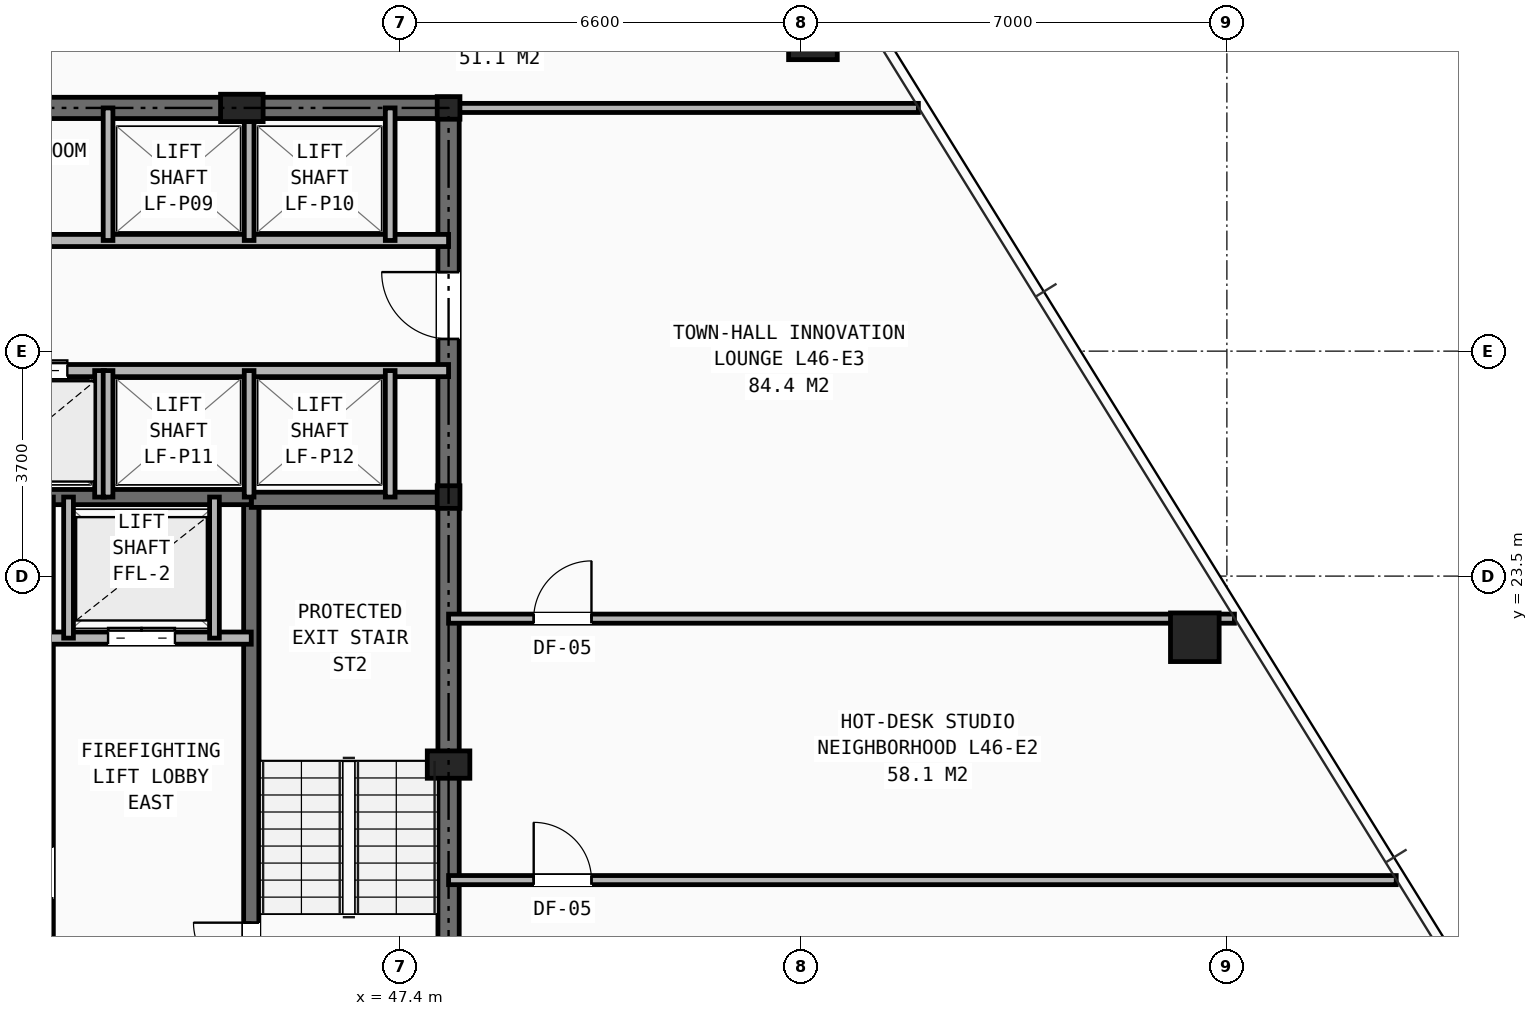
"""IFC4 building model, lengths in metres.
Left out: names, types, materials, properties, quantities, classifications, styles, units other than length and angle.
Written with IfcOpenShell. Run it as: python <this file> out.ifc"""

import sys

from ifc_helpers import new_model, si_unit, direction, frame, frame_2d, origin, origin_2d, place, context, subcontext, project, spatial, rectangle, hollow_rectangle, i_section, extrude, element, fill, save


model = new_model("IFC4")
c1 = context("Model", 3, precision=1e-05, world=origin(), true_north=direction((0.0, 1.0)))
c2 = subcontext(c1, "Body", "Model", "MODEL_VIEW")
j1 = project(units=[si_unit("LENGTHUNIT", "METRE"), si_unit("PLANEANGLEUNIT", "RADIAN")], contexts=[c1])
p1 = place(None, origin())
s1 = spatial("IfcSite", under=j1, at=p1, CompositionType="ELEMENT")
p2 = place(p1, origin())
s2 = spatial("IfcBuilding", under=s1, at=p2, CompositionType="ELEMENT")
p3 = place(p2, frame((0.0, 0.0, 162.0)))
s3 = spatial("IfcBuildingStorey", under=s2, at=p3, CompositionType="ELEMENT", Elevation=162.0)
for number, where, z_axis, x_axis in (
    (1, (48.2, 24.8, 0.0), (0.0, 0.0, 1.0), (1.0, 0.0, 0.0)),
    (2, (48.2, 31.2, 0.0), (0.0, 0.0, 1.0), (1.0, 0.0, 0.0)),
):
    element("IfcColumn", number, at=place(p3, frame(where, z_axis=z_axis, x_axis=x_axis)), inside=s3, PredefinedType="COLUMN", context=c2, shape_type="SweptSolid", body=[
        extrude(i_section(OverallWidth=0.374, OverallDepth=0.372, WebThickness=0.016, FlangeThickness=0.026, at=origin_2d()), origin(), (0.0, 0.0, 1.0), 3.45),
    ])
for number, where, z_axis, x_axis in (
    (3, (48.2, 20.4, 0.0), (0.0, 0.0, 1.0), (1.0, 0.0, 0.0)),
    (4, (44.8, 31.2, 0.0), (0.0, 0.0, 1.0), (1.0, 0.0, 0.0)),
):
    element("IfcColumn", number, at=place(p3, frame(where, z_axis=z_axis, x_axis=x_axis)), inside=s3, PredefinedType="PILASTER", context=c2, shape_type="SweptSolid", body=[
        extrude(rectangle(XDim=0.7, YDim=0.45, at=origin_2d()), origin(), (0.0, 0.0, 1.0), 3.45),
    ])
for number, where, z_axis, x_axis in (
    (5, (60.473, 22.494, 0.0), (0.0, 0.0, 1.0), (1.0, 0.0, 0.0)),
    (6, (54.192, 32.394, 0.0), (0.0, 0.0, 1.0), (1.0, 0.0, 0.0)),
):
    element("IfcColumn", number, at=place(p3, frame(where, z_axis=z_axis, x_axis=x_axis)), inside=s3, PredefinedType="COLUMN", context=c2, shape_type="SweptSolid", body=[
        extrude(hollow_rectangle(XDim=0.8, YDim=0.8, WallThickness=0.055, at=origin_2d()), origin(), (0.0, 0.0, 1.0), 3.45),
    ])
p4 = place(p3, frame((31.8, 31.2, 0.0), z_axis=(0.0, 0.0, 1.0), x_axis=(1.0, 0.0, 0.0)))
e7 = element("IfcWall", 7, at=p4, inside=s3, PredefinedType="SHEAR", context=c2, shape_type="SweptSolid", body=[
    extrude(rectangle(XDim=16.4, YDim=0.35, at=frame_2d((8.2, 0.0))), origin(), (0.0, 0.0, 1.0), 3.21),
])
p5 = place(p3, frame((48.2, 16.4, 0.0), z_axis=(0.0, 0.0, 1.0), x_axis=(0.0, 1.0, 0.0)))
e8 = element("IfcWall", 8, at=p5, inside=s3, PredefinedType="SHEAR", context=c2, shape_type="SweptSolid", body=[
    extrude(rectangle(XDim=14.8, YDim=0.35, at=frame_2d((7.4, 0.0))), origin(), (0.0, 0.0, 1.0), 3.21),
])
p6 = place(p5, frame((11.0, 0.0, 0.0)))
e9 = element("IfcOpeningElement", 9, at=p6, cuts=e8, PredefinedType="OPENING", context=c2, shape_type="SweptSolid", body=[
    extrude(rectangle(XDim=1.1, YDim=2.15, at=frame_2d((0.55, 1.075))), frame((0.0, 0.185, 0.0), z_axis=(0.0, -1.0, 0.0), x_axis=(1.0, 0.0, 0.0)), (0.0, 0.0, 1.0), 0.37),
])
p7 = place(p3, frame((44.955, 16.4, 0.0), z_axis=(0.0, 0.0, 1.0), x_axis=(0.0, 1.0, 0.0)))
e10 = element("IfcWall", 10, at=p7, inside=s3, PredefinedType="SHEAR", context=c2, shape_type="SweptSolid", body=[
    extrude(rectangle(XDim=8.4, YDim=0.25, at=frame_2d((4.2, 0.0))), origin(), (0.0, 0.0, 1.0), 3.21),
])
p8 = place(p7, frame((0.45, 0.0, 0.0)))
e11 = element("IfcOpeningElement", 11, at=p8, cuts=e10, PredefinedType="OPENING", context=c2, shape_type="SweptSolid", body=[
    extrude(rectangle(XDim=0.95, YDim=2.1, at=frame_2d((0.475, 1.05))), frame((0.0, 0.135, 0.0), z_axis=(0.0, -1.0, 0.0), x_axis=(1.0, 0.0, 0.0)), (0.0, 0.0, 1.0), 0.27),
])
p9 = place(p3, frame((44.955, 24.755, 0.0), z_axis=(0.0, 0.0, 1.0), x_axis=(1.0, 0.0, 0.0)))
e12 = element("IfcWall", 12, at=p9, inside=s3, PredefinedType="SHEAR", context=c2, shape_type="SweptSolid", body=[
    extrude(rectangle(XDim=3.245, YDim=0.25, at=frame_2d((1.623, 0.0))), origin(), (0.0, 0.0, 1.0), 3.21),
])
p10 = place(p3, frame((35.045, 24.8, 0.0), z_axis=(0.0, 0.0, 1.0), x_axis=(1.0, 0.0, 0.0)))
e13 = element("IfcWall", 13, at=p10, inside=s3, PredefinedType="SHEAR", context=c2, shape_type="SweptSolid", body=[
    extrude(rectangle(XDim=9.91, YDim=0.25, at=frame_2d((4.955, 0.0))), origin(), (0.0, 0.0, 1.0), 3.21),
])
p11 = place(p3, frame((41.61, 16.4, 0.0), z_axis=(0.0, 0.0, 1.0), x_axis=(0.0, 1.0, 0.0)))
e14 = element("IfcWall", 14, at=p11, inside=s3, PredefinedType="PARTITIONING", context=c2, shape_type="SweptSolid", body=[
    extrude(rectangle(XDim=8.4, YDim=0.18, at=frame_2d((4.2, 0.0))), origin(), (0.0, 0.0, 1.0), 2.665),
])
p12 = place(p11, frame((1.8, 0.0, 0.0)))
e15 = element("IfcOpeningElement", 15, at=p12, cuts=e14, PredefinedType="OPENING", context=c2, shape_type="SweptSolid", body=[
    extrude(rectangle(XDim=0.85, YDim=2.05, at=frame_2d((0.425, 1.025))), frame((0.0, 0.1, 0.0), z_axis=(0.0, -1.0, 0.0), x_axis=(1.0, 0.0, 0.0)), (0.0, 0.0, 1.0), 0.2),
])
p13 = place(p3, frame((35.045, 22.48, 0.0), z_axis=(0.0, 0.0, 1.0), x_axis=(1.0, 0.0, 0.0)))
e16 = element("IfcWall", 16, at=p13, inside=s3, PredefinedType="SOLIDWALL", context=c2, shape_type="SweptSolid", body=[
    extrude(rectangle(XDim=9.91, YDim=0.2, at=frame_2d((4.955, 0.0))), origin(), (0.0, 0.0, 1.0), 3.21),
])
p14 = place(p13, frame((1.255, 0.0, 0.0)))
e17 = element("IfcOpeningElement", 17, at=p14, cuts=e16, PredefinedType="OPENING", context=c2, shape_type="SweptSolid", body=[
    extrude(rectangle(XDim=1.1, YDim=2.15, at=frame_2d((0.55, 1.075))), frame((0.0, 0.11, 0.0), z_axis=(0.0, -1.0, 0.0), x_axis=(1.0, 0.0, 0.0)), (0.0, 0.0, 1.0), 0.22),
])
p15 = place(p13, frame((7.555, 0.0, 0.0)))
e18 = element("IfcOpeningElement", 18, at=p15, cuts=e16, PredefinedType="OPENING", context=c2, shape_type="SweptSolid", body=[
    extrude(rectangle(XDim=1.1, YDim=2.15, at=frame_2d((0.55, 1.075))), frame((0.0, 0.11, 0.0), z_axis=(0.0, -1.0, 0.0), x_axis=(1.0, 0.0, 0.0)), (0.0, 0.0, 1.0), 0.22),
])
p16 = place(p13, frame((4.405, 0.0, 0.0)))
e19 = element("IfcOpeningElement", 19, at=p16, cuts=e16, PredefinedType="OPENING", context=c2, shape_type="SweptSolid", body=[
    extrude(rectangle(XDim=1.1, YDim=2.15, at=frame_2d((0.55, 1.075))), frame((0.0, 0.11, 0.0), z_axis=(0.0, -1.0, 0.0), x_axis=(1.0, 0.0, 0.0)), (0.0, 0.0, 1.0), 0.22),
])
for number, where, z_axis, x_axis in (
    (20, (41.95, 22.48, 0.0), (0.0, 0.0, 1.0), (0.0, 1.0, 0.0)),
    (21, (44.35, 22.48, 0.0), (0.0, 0.0, 1.0), (0.0, 1.0, 0.0)),
):
    element("IfcWall", number, at=place(p3, frame(where, z_axis=z_axis, x_axis=x_axis)), inside=s3, PredefinedType="SOLIDWALL", context=c2, shape_type="SweptSolid", body=[
        extrude(rectangle(XDim=2.32, YDim=0.16, at=frame_2d((1.16, 0.0))), origin(), (0.0, 0.0, 1.0), 3.21),
    ])
p17 = place(p3, frame((33.82, 29.02, 0.0), z_axis=(0.0, 0.0, 1.0), x_axis=(1.0, 0.0, 0.0)))
e22 = element("IfcWall", 22, at=p17, inside=s3, PredefinedType="SOLIDWALL", context=c2, shape_type="SweptSolid", body=[
    extrude(rectangle(XDim=14.38, YDim=0.2, at=frame_2d((7.19, 0.0))), origin(), (0.0, 0.0, 1.0), 2.665),
])
p18 = place(p17, frame((3.92, 0.0, 0.0)))
e23 = element("IfcOpeningElement", 23, at=p18, cuts=e22, PredefinedType="OPENING", context=c2, shape_type="SweptSolid", body=[
    extrude(rectangle(XDim=0.9, YDim=2.1, at=frame_2d((0.45, 1.05))), frame((0.0, 0.11, 0.0), z_axis=(0.0, -1.0, 0.0), x_axis=(1.0, 0.0, 0.0)), (0.0, 0.0, 1.0), 0.22),
])
p19 = place(p3, frame((33.82, 26.88, 0.0), z_axis=(0.0, 0.0, 1.0), x_axis=(1.0, 0.0, 0.0)))
e24 = element("IfcWall", 24, at=p19, inside=s3, PredefinedType="SOLIDWALL", context=c2, shape_type="SweptSolid", body=[
    extrude(rectangle(XDim=14.38, YDim=0.2, at=frame_2d((7.19, 0.0))), origin(), (0.0, 0.0, 1.0), 2.665),
])
p20 = place(p19, frame((0.53, 0.0, 0.0)))
e25 = element("IfcOpeningElement", 25, at=p20, cuts=e24, PredefinedType="OPENING", context=c2, shape_type="SweptSolid", body=[
    extrude(rectangle(XDim=1.1, YDim=2.15, at=frame_2d((0.55, 1.075))), frame((0.0, 0.11, 0.0), z_axis=(0.0, -1.0, 0.0), x_axis=(1.0, 0.0, 0.0)), (0.0, 0.0, 1.0), 0.22),
])
p21 = place(p19, frame((2.69, 0.0, 0.0)))
e26 = element("IfcOpeningElement", 26, at=p21, cuts=e24, PredefinedType="OPENING", context=c2, shape_type="SweptSolid", body=[
    extrude(rectangle(XDim=1.1, YDim=2.15, at=frame_2d((0.55, 1.075))), frame((0.0, 0.11, 0.0), z_axis=(0.0, -1.0, 0.0), x_axis=(1.0, 0.0, 0.0)), (0.0, 0.0, 1.0), 0.22),
])
p22 = place(p19, frame((4.85, 0.0, 0.0)))
e27 = element("IfcOpeningElement", 27, at=p22, cuts=e24, PredefinedType="OPENING", context=c2, shape_type="SweptSolid", body=[
    extrude(rectangle(XDim=1.1, YDim=2.15, at=frame_2d((0.55, 1.075))), frame((0.0, 0.11, 0.0), z_axis=(0.0, -1.0, 0.0), x_axis=(1.0, 0.0, 0.0)), (0.0, 0.0, 1.0), 0.22),
])
p23 = place(p19, frame((7.01, 0.0, 0.0)))
e28 = element("IfcOpeningElement", 28, at=p23, cuts=e24, PredefinedType="OPENING", context=c2, shape_type="SweptSolid", body=[
    extrude(rectangle(XDim=1.1, YDim=2.15, at=frame_2d((0.55, 1.075))), frame((0.0, 0.11, 0.0), z_axis=(0.0, -1.0, 0.0), x_axis=(1.0, 0.0, 0.0)), (0.0, 0.0, 1.0), 0.22),
])
p24 = place(p3, frame((42.46, 24.8, 0.0), z_axis=(0.0, 0.0, 1.0), x_axis=(0.0, 1.0, 0.0)))
e29 = element("IfcWall", 29, at=p24, inside=s3, PredefinedType="SOLIDWALL", context=c2, shape_type="SweptSolid", body=[
    extrude(rectangle(XDim=2.08, YDim=0.16, at=frame_2d((1.04, 0.0))), origin(), (0.0, 0.0, 1.0), 3.21),
])
for number, where, z_axis, x_axis in (
    (30, (42.6, 29.02, 0.0), (0.0, 0.0, 1.0), (0.0, 1.0, 0.0)),
    (31, (44.92, 29.02, 0.0), (0.0, 0.0, 1.0), (0.0, 1.0, 0.0)),
    (32, (47.24, 29.02, 0.0), (0.0, 0.0, 1.0), (0.0, 1.0, 0.0)),
):
    element("IfcWall", number, at=place(p3, frame(where, z_axis=z_axis, x_axis=x_axis)), inside=s3, PredefinedType="SOLIDWALL", context=c2, shape_type="SweptSolid", body=[
        extrude(rectangle(XDim=2.18, YDim=0.16, at=frame_2d((1.09, 0.0))), origin(), (0.0, 0.0, 1.0), 2.665),
    ])
for number, where, z_axis, x_axis in (
    (33, (42.6, 24.8, 0.0), (0.0, 0.0, 1.0), (0.0, 1.0, 0.0)),
    (34, (44.92, 24.8, 0.0), (0.0, 0.0, 1.0), (0.0, 1.0, 0.0)),
    (35, (47.24, 24.8, 0.0), (0.0, 0.0, 1.0), (0.0, 1.0, 0.0)),
):
    element("IfcWall", number, at=place(p3, frame(where, z_axis=z_axis, x_axis=x_axis)), inside=s3, PredefinedType="SOLIDWALL", context=c2, shape_type="SweptSolid", body=[
        extrude(rectangle(XDim=2.08, YDim=0.16, at=frame_2d((1.04, 0.0))), origin(), (0.0, 0.0, 1.0), 3.21),
    ])
p25 = place(p3, frame((48.2, 31.2, 0.0), z_axis=(0.0, 0.0, 1.0), x_axis=(1.0, 0.0, 0.0)))
e36 = element("IfcWall", 36, at=p25, inside=s3, PredefinedType="PARTITIONING", context=c2, shape_type="SweptSolid", body=[
    extrude(rectangle(XDim=7.727, YDim=0.15, at=frame_2d((3.863, 0.0))), origin(), (0.0, 0.0, 1.0), 2.252),
])
p26 = place(p3, frame((48.2, 18.5, 0.0), z_axis=(0.0, 0.0, 1.0), x_axis=(1.0, 0.0, 0.0)))
e37 = element("IfcWall", 37, at=p26, inside=s3, PredefinedType="PARTITIONING", context=c2, shape_type="SweptSolid", body=[
    extrude(rectangle(XDim=15.585, YDim=0.15, at=frame_2d((7.792, 0.0))), origin(), (0.0, 0.0, 1.0), 2.589),
])
p27 = place(p26, frame((1.4, 0.0, 0.0)))
e38 = element("IfcOpeningElement", 38, at=p27, cuts=e37, PredefinedType="OPENING", context=c2, shape_type="SweptSolid", body=[
    extrude(rectangle(XDim=0.95, YDim=2.1, at=frame_2d((0.475, 1.05))), frame((0.0, 0.085, 0.0), z_axis=(0.0, -1.0, 0.0), x_axis=(1.0, 0.0, 0.0)), (0.0, 0.0, 1.0), 0.17),
])
p28 = place(p3, frame((48.2, 22.8, 0.0), z_axis=(0.0, 0.0, 1.0), x_axis=(1.0, 0.0, 0.0)))
e39 = element("IfcWall", 39, at=p28, inside=s3, PredefinedType="PARTITIONING", context=c2, shape_type="SweptSolid", body=[
    extrude(rectangle(XDim=12.924, YDim=0.15, at=frame_2d((6.462, 0.0))), origin(), (0.0, 0.0, 1.0), 2.589),
])
p29 = place(p28, frame((1.4, 0.0, 0.0)))
e40 = element("IfcOpeningElement", 40, at=p29, cuts=e39, PredefinedType="OPENING", context=c2, shape_type="SweptSolid", body=[
    extrude(rectangle(XDim=0.95, YDim=2.1, at=frame_2d((0.475, 1.05))), frame((0.0, 0.085, 0.0), z_axis=(0.0, -1.0, 0.0), x_axis=(1.0, 0.0, 0.0)), (0.0, 0.0, 1.0), 0.17),
])
p30 = place(p8, origin())
e41 = element("IfcDoor", 41, at=p30, inside=s3, OperationType="SINGLE_SWING_RIGHT", PredefinedType="DOOR", context=c2, shape_type="SweptSolid", body=[
    extrude(rectangle(XDim=0.95, YDim=2.1, at=frame_2d((0.475, 1.05))), frame((0.0, 0.025, 0.0), z_axis=(0.0, -1.0, 0.0), x_axis=(1.0, 0.0, 0.0)), (0.0, 0.0, 1.0), 0.05),
])
fill(e11, e41)
p31 = place(p15, origin())
e42 = element("IfcDoor", 42, at=p31, inside=s3, OperationType="DOUBLE_DOOR_SLIDING", PredefinedType="DOOR", context=c2, shape_type="SweptSolid", body=[
    extrude(rectangle(XDim=1.1, YDim=2.15, at=frame_2d((0.55, 1.075))), frame((0.0, 0.025, 0.0), z_axis=(0.0, -1.0, 0.0), x_axis=(1.0, 0.0, 0.0)), (0.0, 0.0, 1.0), 0.05),
])
fill(e18, e42)
p32 = place(p6, origin())
e43 = element("IfcDoor", 43, at=p32, inside=s3, OperationType="SINGLE_SWING_RIGHT", PredefinedType="DOOR", context=c2, shape_type="SweptSolid", body=[
    extrude(rectangle(XDim=1.1, YDim=2.15, at=frame_2d((0.55, 1.075))), frame((0.0, 0.025, 0.0), z_axis=(0.0, -1.0, 0.0), x_axis=(1.0, 0.0, 0.0)), (0.0, 0.0, 1.0), 0.05),
])
fill(e9, e43)
p33 = place(p23, origin())
e44 = element("IfcDoor", 44, at=p33, inside=s3, OperationType="DOUBLE_DOOR_SLIDING", PredefinedType="DOOR", context=c2, shape_type="SweptSolid", body=[
    extrude(rectangle(XDim=1.1, YDim=2.15, at=frame_2d((0.55, 1.075))), frame((0.0, 0.025, 0.0), z_axis=(0.0, -1.0, 0.0), x_axis=(1.0, 0.0, 0.0)), (0.0, 0.0, 1.0), 0.05),
])
fill(e28, e44)
p34 = place(p27, origin())
e45 = element("IfcDoor", 45, at=p34, inside=s3, OperationType="SINGLE_SWING_LEFT", PredefinedType="DOOR", context=c2, shape_type="SweptSolid", body=[
    extrude(rectangle(XDim=0.95, YDim=2.1, at=frame_2d((0.475, 1.05))), frame((0.0, 0.025, 0.0), z_axis=(0.0, -1.0, 0.0), x_axis=(1.0, 0.0, 0.0)), (0.0, 0.0, 1.0), 0.05),
])
fill(e38, e45)
p35 = place(p29, origin())
e46 = element("IfcDoor", 46, at=p35, inside=s3, OperationType="SINGLE_SWING_RIGHT", PredefinedType="DOOR", context=c2, shape_type="SweptSolid", body=[
    extrude(rectangle(XDim=0.95, YDim=2.1, at=frame_2d((0.475, 1.05))), frame((0.0, 0.025, 0.0), z_axis=(0.0, -1.0, 0.0), x_axis=(1.0, 0.0, 0.0)), (0.0, 0.0, 1.0), 0.05),
])
fill(e40, e46)
save(model, sys.argv[1])
